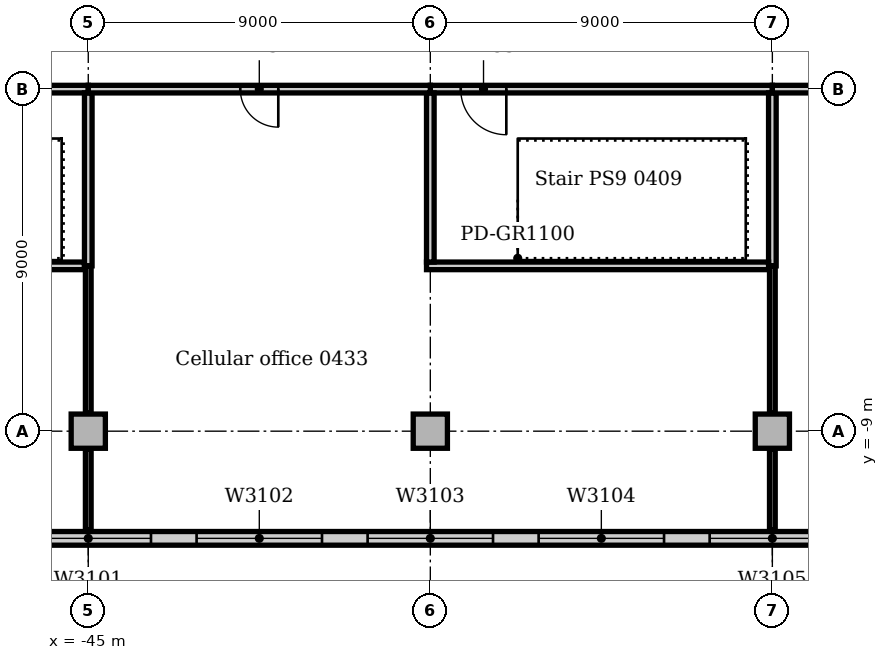
"""IFC4 building model, lengths in metres.
Left out: names, types, materials, properties, quantities, classifications, styles, units other than length and angle.
Written with IfcOpenShell. Run it as: python <this file> out.ifc"""

import sys

from ifc_helpers import new_model, si_unit, direction, frame, frame_2d, origin, origin_2d, place, context, subcontext, project, spatial, rectangle, extrude, element, fill, save


model = new_model("IFC4")
c1 = context("Model", 3, precision=1e-05, world=origin(), true_north=direction((0.0, 1.0)))
c2 = subcontext(c1, "Body", "Model", "MODEL_VIEW")
j1 = project(units=[si_unit("LENGTHUNIT", "METRE"), si_unit("PLANEANGLEUNIT", "RADIAN")], contexts=[c1])
p1 = place(None, origin())
s1 = spatial("IfcSite", under=j1, at=p1, CompositionType="ELEMENT")
p2 = place(p1, origin())
s2 = spatial("IfcBuilding", under=s1, at=p2, CompositionType="ELEMENT")
p3 = place(p2, frame((0.0, 0.0, 21.0)))
s3 = spatial("IfcBuildingStorey", under=s2, at=p3, CompositionType="ELEMENT", Elevation=21.0)
for number, where, z_axis, x_axis in (
    (1, (-45.0, -9.0, 0.0), (0.0, 0.0, 1.0), (1.0, 0.0, 0.0)),
    (2, (-36.0, -9.0, 0.0), (0.0, 0.0, 1.0), (1.0, 0.0, 0.0)),
    (3, (-27.0, -9.0, 0.0), (0.0, 0.0, 1.0), (1.0, 0.0, 0.0)),
):
    element("IfcColumn", number, at=place(p3, frame(where, z_axis=z_axis, x_axis=x_axis)), inside=s3, PredefinedType="COLUMN", context=c2, shape_type="SweptSolid", body=[
        extrude(rectangle(XDim=0.9, YDim=0.9, at=origin_2d()), origin(), (0.0, 0.0, 1.0), 4.7),
    ])
p4 = place(p3, frame((-81.0, -11.82, 0.0), z_axis=(0.0, 0.0, 1.0), x_axis=(1.0, 0.0, 0.0)))
e4 = element("IfcWall", 4, at=p4, inside=s3, PredefinedType="STANDARD", context=c2, shape_type="SweptSolid", body=[
    extrude(rectangle(XDim=144.0, YDim=0.36, at=frame_2d((72.0, 0.0))), origin(), (0.0, 0.0, 1.0), 4.85),
])
p5 = place(p4, frame((2.85, 0.0, 0.9)))
e5 = element("IfcOpeningElement", 5, at=p5, cuts=e4, PredefinedType="OPENING", context=c2, shape_type="SweptSolid", body=[
    extrude(rectangle(XDim=3.3, YDim=2.4, at=frame_2d((1.65, 1.2))), frame((0.0, 0.19, 0.0), z_axis=(0.0, -1.0, 0.0), x_axis=(1.0, 0.0, 0.0)), (0.0, 0.0, 1.0), 0.38),
])
p6 = place(p4, frame((7.35, 0.0, 0.9)))
e6 = element("IfcOpeningElement", 6, at=p6, cuts=e4, PredefinedType="OPENING", context=c2, shape_type="SweptSolid", body=[
    extrude(rectangle(XDim=3.3, YDim=2.4, at=frame_2d((1.65, 1.2))), frame((0.0, 0.19, 0.0), z_axis=(0.0, -1.0, 0.0), x_axis=(1.0, 0.0, 0.0)), (0.0, 0.0, 1.0), 0.38),
])
p7 = place(p4, frame((11.85, 0.0, 0.9)))
e7 = element("IfcOpeningElement", 7, at=p7, cuts=e4, PredefinedType="OPENING", context=c2, shape_type="SweptSolid", body=[
    extrude(rectangle(XDim=3.3, YDim=2.4, at=frame_2d((1.65, 1.2))), frame((0.0, 0.19, 0.0), z_axis=(0.0, -1.0, 0.0), x_axis=(1.0, 0.0, 0.0)), (0.0, 0.0, 1.0), 0.38),
])
p8 = place(p4, frame((16.35, 0.0, 0.9)))
e8 = element("IfcOpeningElement", 8, at=p8, cuts=e4, PredefinedType="OPENING", context=c2, shape_type="SweptSolid", body=[
    extrude(rectangle(XDim=3.3, YDim=2.4, at=frame_2d((1.65, 1.2))), frame((0.0, 0.19, 0.0), z_axis=(0.0, -1.0, 0.0), x_axis=(1.0, 0.0, 0.0)), (0.0, 0.0, 1.0), 0.38),
])
p9 = place(p4, frame((20.85, 0.0, 0.9)))
e9 = element("IfcOpeningElement", 9, at=p9, cuts=e4, PredefinedType="OPENING", context=c2, shape_type="SweptSolid", body=[
    extrude(rectangle(XDim=3.3, YDim=2.4, at=frame_2d((1.65, 1.2))), frame((0.0, 0.19, 0.0), z_axis=(0.0, -1.0, 0.0), x_axis=(1.0, 0.0, 0.0)), (0.0, 0.0, 1.0), 0.38),
])
p10 = place(p4, frame((25.35, 0.0, 0.9)))
e10 = element("IfcOpeningElement", 10, at=p10, cuts=e4, PredefinedType="OPENING", context=c2, shape_type="SweptSolid", body=[
    extrude(rectangle(XDim=3.3, YDim=2.4, at=frame_2d((1.65, 1.2))), frame((0.0, 0.19, 0.0), z_axis=(0.0, -1.0, 0.0), x_axis=(1.0, 0.0, 0.0)), (0.0, 0.0, 1.0), 0.38),
])
p11 = place(p4, frame((29.85, 0.0, 0.9)))
e11 = element("IfcOpeningElement", 11, at=p11, cuts=e4, PredefinedType="OPENING", context=c2, shape_type="SweptSolid", body=[
    extrude(rectangle(XDim=3.3, YDim=2.4, at=frame_2d((1.65, 1.2))), frame((0.0, 0.19, 0.0), z_axis=(0.0, -1.0, 0.0), x_axis=(1.0, 0.0, 0.0)), (0.0, 0.0, 1.0), 0.38),
])
p12 = place(p4, frame((34.35, 0.0, 0.9)))
e12 = element("IfcOpeningElement", 12, at=p12, cuts=e4, PredefinedType="OPENING", context=c2, shape_type="SweptSolid", body=[
    extrude(rectangle(XDim=3.3, YDim=2.4, at=frame_2d((1.65, 1.2))), frame((0.0, 0.19, 0.0), z_axis=(0.0, -1.0, 0.0), x_axis=(1.0, 0.0, 0.0)), (0.0, 0.0, 1.0), 0.38),
])
p13 = place(p4, frame((38.85, 0.0, 0.9)))
e13 = element("IfcOpeningElement", 13, at=p13, cuts=e4, PredefinedType="OPENING", context=c2, shape_type="SweptSolid", body=[
    extrude(rectangle(XDim=3.3, YDim=2.4, at=frame_2d((1.65, 1.2))), frame((0.0, 0.19, 0.0), z_axis=(0.0, -1.0, 0.0), x_axis=(1.0, 0.0, 0.0)), (0.0, 0.0, 1.0), 0.38),
])
p14 = place(p4, frame((43.35, 0.0, 0.9)))
e14 = element("IfcOpeningElement", 14, at=p14, cuts=e4, PredefinedType="OPENING", context=c2, shape_type="SweptSolid", body=[
    extrude(rectangle(XDim=3.3, YDim=2.4, at=frame_2d((1.65, 1.2))), frame((0.0, 0.19, 0.0), z_axis=(0.0, -1.0, 0.0), x_axis=(1.0, 0.0, 0.0)), (0.0, 0.0, 1.0), 0.38),
])
p15 = place(p4, frame((47.85, 0.0, 0.9)))
e15 = element("IfcOpeningElement", 15, at=p15, cuts=e4, PredefinedType="OPENING", context=c2, shape_type="SweptSolid", body=[
    extrude(rectangle(XDim=3.3, YDim=2.4, at=frame_2d((1.65, 1.2))), frame((0.0, 0.19, 0.0), z_axis=(0.0, -1.0, 0.0), x_axis=(1.0, 0.0, 0.0)), (0.0, 0.0, 1.0), 0.38),
])
p16 = place(p4, frame((52.35, 0.0, 0.9)))
e16 = element("IfcOpeningElement", 16, at=p16, cuts=e4, PredefinedType="OPENING", context=c2, shape_type="SweptSolid", body=[
    extrude(rectangle(XDim=3.3, YDim=2.4, at=frame_2d((1.65, 1.2))), frame((0.0, 0.19, 0.0), z_axis=(0.0, -1.0, 0.0), x_axis=(1.0, 0.0, 0.0)), (0.0, 0.0, 1.0), 0.38),
])
p17 = place(p4, frame((56.85, 0.0, 0.9)))
e17 = element("IfcOpeningElement", 17, at=p17, cuts=e4, PredefinedType="OPENING", context=c2, shape_type="SweptSolid", body=[
    extrude(rectangle(XDim=3.3, YDim=2.4, at=frame_2d((1.65, 1.2))), frame((0.0, 0.19, 0.0), z_axis=(0.0, -1.0, 0.0), x_axis=(1.0, 0.0, 0.0)), (0.0, 0.0, 1.0), 0.38),
])
p18 = place(p4, frame((61.35, 0.0, 0.9)))
e18 = element("IfcOpeningElement", 18, at=p18, cuts=e4, PredefinedType="OPENING", context=c2, shape_type="SweptSolid", body=[
    extrude(rectangle(XDim=3.3, YDim=2.4, at=frame_2d((1.65, 1.2))), frame((0.0, 0.19, 0.0), z_axis=(0.0, -1.0, 0.0), x_axis=(1.0, 0.0, 0.0)), (0.0, 0.0, 1.0), 0.38),
])
p19 = place(p4, frame((65.85, 0.0, 0.9)))
e19 = element("IfcOpeningElement", 19, at=p19, cuts=e4, PredefinedType="OPENING", context=c2, shape_type="SweptSolid", body=[
    extrude(rectangle(XDim=3.3, YDim=2.4, at=frame_2d((1.65, 1.2))), frame((0.0, 0.19, 0.0), z_axis=(0.0, -1.0, 0.0), x_axis=(1.0, 0.0, 0.0)), (0.0, 0.0, 1.0), 0.38),
])
p20 = place(p4, frame((70.35, 0.0, 0.9)))
e20 = element("IfcOpeningElement", 20, at=p20, cuts=e4, PredefinedType="OPENING", context=c2, shape_type="SweptSolid", body=[
    extrude(rectangle(XDim=3.3, YDim=2.4, at=frame_2d((1.65, 1.2))), frame((0.0, 0.19, 0.0), z_axis=(0.0, -1.0, 0.0), x_axis=(1.0, 0.0, 0.0)), (0.0, 0.0, 1.0), 0.38),
])
p21 = place(p4, frame((74.85, 0.0, 0.9)))
e21 = element("IfcOpeningElement", 21, at=p21, cuts=e4, PredefinedType="OPENING", context=c2, shape_type="SweptSolid", body=[
    extrude(rectangle(XDim=3.3, YDim=2.4, at=frame_2d((1.65, 1.2))), frame((0.0, 0.19, 0.0), z_axis=(0.0, -1.0, 0.0), x_axis=(1.0, 0.0, 0.0)), (0.0, 0.0, 1.0), 0.38),
])
p22 = place(p4, frame((79.35, 0.0, 0.9)))
e22 = element("IfcOpeningElement", 22, at=p22, cuts=e4, PredefinedType="OPENING", context=c2, shape_type="SweptSolid", body=[
    extrude(rectangle(XDim=3.3, YDim=2.4, at=frame_2d((1.65, 1.2))), frame((0.0, 0.19, 0.0), z_axis=(0.0, -1.0, 0.0), x_axis=(1.0, 0.0, 0.0)), (0.0, 0.0, 1.0), 0.38),
])
p23 = place(p4, frame((83.85, 0.0, 0.9)))
e23 = element("IfcOpeningElement", 23, at=p23, cuts=e4, PredefinedType="OPENING", context=c2, shape_type="SweptSolid", body=[
    extrude(rectangle(XDim=3.3, YDim=2.4, at=frame_2d((1.65, 1.2))), frame((0.0, 0.19, 0.0), z_axis=(0.0, -1.0, 0.0), x_axis=(1.0, 0.0, 0.0)), (0.0, 0.0, 1.0), 0.38),
])
p24 = place(p4, frame((88.35, 0.0, 0.9)))
e24 = element("IfcOpeningElement", 24, at=p24, cuts=e4, PredefinedType="OPENING", context=c2, shape_type="SweptSolid", body=[
    extrude(rectangle(XDim=3.3, YDim=2.4, at=frame_2d((1.65, 1.2))), frame((0.0, 0.19, 0.0), z_axis=(0.0, -1.0, 0.0), x_axis=(1.0, 0.0, 0.0)), (0.0, 0.0, 1.0), 0.38),
])
p25 = place(p4, frame((92.85, 0.0, 0.9)))
e25 = element("IfcOpeningElement", 25, at=p25, cuts=e4, PredefinedType="OPENING", context=c2, shape_type="SweptSolid", body=[
    extrude(rectangle(XDim=3.3, YDim=2.4, at=frame_2d((1.65, 1.2))), frame((0.0, 0.19, 0.0), z_axis=(0.0, -1.0, 0.0), x_axis=(1.0, 0.0, 0.0)), (0.0, 0.0, 1.0), 0.38),
])
p26 = place(p4, frame((97.35, 0.0, 0.9)))
e26 = element("IfcOpeningElement", 26, at=p26, cuts=e4, PredefinedType="OPENING", context=c2, shape_type="SweptSolid", body=[
    extrude(rectangle(XDim=3.3, YDim=2.4, at=frame_2d((1.65, 1.2))), frame((0.0, 0.19, 0.0), z_axis=(0.0, -1.0, 0.0), x_axis=(1.0, 0.0, 0.0)), (0.0, 0.0, 1.0), 0.38),
])
p27 = place(p4, frame((101.85, 0.0, 0.9)))
e27 = element("IfcOpeningElement", 27, at=p27, cuts=e4, PredefinedType="OPENING", context=c2, shape_type="SweptSolid", body=[
    extrude(rectangle(XDim=3.3, YDim=2.4, at=frame_2d((1.65, 1.2))), frame((0.0, 0.19, 0.0), z_axis=(0.0, -1.0, 0.0), x_axis=(1.0, 0.0, 0.0)), (0.0, 0.0, 1.0), 0.38),
])
p28 = place(p4, frame((106.35, 0.0, 0.9)))
e28 = element("IfcOpeningElement", 28, at=p28, cuts=e4, PredefinedType="OPENING", context=c2, shape_type="SweptSolid", body=[
    extrude(rectangle(XDim=3.3, YDim=2.4, at=frame_2d((1.65, 1.2))), frame((0.0, 0.19, 0.0), z_axis=(0.0, -1.0, 0.0), x_axis=(1.0, 0.0, 0.0)), (0.0, 0.0, 1.0), 0.38),
])
p29 = place(p4, frame((110.85, 0.0, 0.9)))
e29 = element("IfcOpeningElement", 29, at=p29, cuts=e4, PredefinedType="OPENING", context=c2, shape_type="SweptSolid", body=[
    extrude(rectangle(XDim=3.3, YDim=2.4, at=frame_2d((1.65, 1.2))), frame((0.0, 0.19, 0.0), z_axis=(0.0, -1.0, 0.0), x_axis=(1.0, 0.0, 0.0)), (0.0, 0.0, 1.0), 0.38),
])
p30 = place(p4, frame((115.35, 0.0, 0.9)))
e30 = element("IfcOpeningElement", 30, at=p30, cuts=e4, PredefinedType="OPENING", context=c2, shape_type="SweptSolid", body=[
    extrude(rectangle(XDim=3.3, YDim=2.4, at=frame_2d((1.65, 1.2))), frame((0.0, 0.19, 0.0), z_axis=(0.0, -1.0, 0.0), x_axis=(1.0, 0.0, 0.0)), (0.0, 0.0, 1.0), 0.38),
])
p31 = place(p4, frame((119.85, 0.0, 0.9)))
e31 = element("IfcOpeningElement", 31, at=p31, cuts=e4, PredefinedType="OPENING", context=c2, shape_type="SweptSolid", body=[
    extrude(rectangle(XDim=3.3, YDim=2.4, at=frame_2d((1.65, 1.2))), frame((0.0, 0.19, 0.0), z_axis=(0.0, -1.0, 0.0), x_axis=(1.0, 0.0, 0.0)), (0.0, 0.0, 1.0), 0.38),
])
p32 = place(p4, frame((124.35, 0.0, 0.9)))
e32 = element("IfcOpeningElement", 32, at=p32, cuts=e4, PredefinedType="OPENING", context=c2, shape_type="SweptSolid", body=[
    extrude(rectangle(XDim=3.3, YDim=2.4, at=frame_2d((1.65, 1.2))), frame((0.0, 0.19, 0.0), z_axis=(0.0, -1.0, 0.0), x_axis=(1.0, 0.0, 0.0)), (0.0, 0.0, 1.0), 0.38),
])
p33 = place(p4, frame((128.85, 0.0, 0.9)))
e33 = element("IfcOpeningElement", 33, at=p33, cuts=e4, PredefinedType="OPENING", context=c2, shape_type="SweptSolid", body=[
    extrude(rectangle(XDim=3.3, YDim=2.4, at=frame_2d((1.65, 1.2))), frame((0.0, 0.19, 0.0), z_axis=(0.0, -1.0, 0.0), x_axis=(1.0, 0.0, 0.0)), (0.0, 0.0, 1.0), 0.38),
])
p34 = place(p4, frame((133.35, 0.0, 0.9)))
e34 = element("IfcOpeningElement", 34, at=p34, cuts=e4, PredefinedType="OPENING", context=c2, shape_type="SweptSolid", body=[
    extrude(rectangle(XDim=3.3, YDim=2.4, at=frame_2d((1.65, 1.2))), frame((0.0, 0.19, 0.0), z_axis=(0.0, -1.0, 0.0), x_axis=(1.0, 0.0, 0.0)), (0.0, 0.0, 1.0), 0.38),
])
p35 = place(p4, frame((137.85, 0.0, 0.9)))
e35 = element("IfcOpeningElement", 35, at=p35, cuts=e4, PredefinedType="OPENING", context=c2, shape_type="SweptSolid", body=[
    extrude(rectangle(XDim=3.3, YDim=2.4, at=frame_2d((1.65, 1.2))), frame((0.0, 0.19, 0.0), z_axis=(0.0, -1.0, 0.0), x_axis=(1.0, 0.0, 0.0)), (0.0, 0.0, 1.0), 0.38),
])
p36 = place(p3, frame((-54.0, 0.0, 0.0), z_axis=(0.0, 0.0, 1.0), x_axis=(1.0, 0.0, 0.0)))
e36 = element("IfcWall", 36, at=p36, inside=s3, PredefinedType="SOLIDWALL", context=c2, shape_type="SweptSolid", body=[
    extrude(rectangle(XDim=9.0, YDim=0.2, at=frame_2d((4.5, 0.0))), origin(), (0.0, 0.0, 1.0), 4.7),
])
p37 = place(p36, frame((0.8, 0.0, 0.0)))
e37 = element("IfcOpeningElement", 37, at=p37, cuts=e36, PredefinedType="OPENING", context=c2, shape_type="SweptSolid", body=[
    extrude(rectangle(XDim=1.2, YDim=2.1, at=frame_2d((0.6, 1.05))), frame((0.0, 0.11, 0.0), z_axis=(0.0, -1.0, 0.0), x_axis=(1.0, 0.0, 0.0)), (0.0, 0.0, 1.0), 0.22),
])
p38 = place(p3, frame((-54.1, -4.65, 0.0), z_axis=(0.0, 0.0, 1.0), x_axis=(1.0, 0.0, 0.0)))
e38 = element("IfcWall", 38, at=p38, inside=s3, PredefinedType="SOLIDWALL", context=c2, shape_type="SweptSolid", body=[
    extrude(rectangle(XDim=9.0, YDim=0.2, at=frame_2d((4.5, 0.0))), origin(), (0.0, 0.0, 1.0), 4.7),
])
p39 = place(p3, frame((-45.0, -4.65, 0.0), z_axis=(0.0, 0.0, 1.0), x_axis=(0.0, 1.0, 0.0)))
e39 = element("IfcWall", 39, at=p39, inside=s3, PredefinedType="SOLIDWALL", context=c2, shape_type="SweptSolid", body=[
    extrude(rectangle(XDim=4.55, YDim=0.2, at=frame_2d((2.275, 0.0))), origin(), (0.0, 0.0, 1.0), 4.7),
])
p40 = place(p3, frame((-36.0, 0.0, 0.0), z_axis=(0.0, 0.0, 1.0), x_axis=(1.0, 0.0, 0.0)))
e40 = element("IfcWall", 40, at=p40, inside=s3, PredefinedType="SOLIDWALL", context=c2, shape_type="SweptSolid", body=[
    extrude(rectangle(XDim=9.0, YDim=0.2, at=frame_2d((4.5, 0.0))), origin(), (0.0, 0.0, 1.0), 4.7),
])
p41 = place(p40, frame((0.8, 0.0, 0.0)))
e41 = element("IfcOpeningElement", 41, at=p41, cuts=e40, PredefinedType="OPENING", context=c2, shape_type="SweptSolid", body=[
    extrude(rectangle(XDim=1.2, YDim=2.1, at=frame_2d((0.6, 1.05))), frame((0.0, 0.11, 0.0), z_axis=(0.0, -1.0, 0.0), x_axis=(1.0, 0.0, 0.0)), (0.0, 0.0, 1.0), 0.22),
])
p42 = place(p3, frame((-27.0, -4.65, 0.0), z_axis=(0.0, 0.0, 1.0), x_axis=(0.0, 1.0, 0.0)))
e42 = element("IfcWall", 42, at=p42, inside=s3, PredefinedType="SOLIDWALL", context=c2, shape_type="SweptSolid", body=[
    extrude(rectangle(XDim=4.55, YDim=0.2, at=frame_2d((2.275, 0.0))), origin(), (0.0, 0.0, 1.0), 4.7),
])
p43 = place(p3, frame((-36.1, -4.65, 0.0), z_axis=(0.0, 0.0, 1.0), x_axis=(1.0, 0.0, 0.0)))
e43 = element("IfcWall", 43, at=p43, inside=s3, PredefinedType="SOLIDWALL", context=c2, shape_type="SweptSolid", body=[
    extrude(rectangle(XDim=9.0, YDim=0.2, at=frame_2d((4.5, 0.0))), origin(), (0.0, 0.0, 1.0), 4.7),
])
p44 = place(p3, frame((-36.0, -4.55, 0.0), z_axis=(0.0, 0.0, 1.0), x_axis=(0.0, 1.0, 0.0)))
e44 = element("IfcWall", 44, at=p44, inside=s3, PredefinedType="SOLIDWALL", context=c2, shape_type="SweptSolid", body=[
    extrude(rectangle(XDim=4.45, YDim=0.2, at=frame_2d((2.225, 0.0))), origin(), (0.0, 0.0, 1.0), 4.7),
])
p45 = place(p3, frame((-45.0, 0.0, 0.0), z_axis=(0.0, 0.0, 1.0), x_axis=(1.0, 0.0, 0.0)))
e45 = element("IfcWall", 45, at=p45, inside=s3, PredefinedType="PARTITIONING", context=c2, shape_type="SweptSolid", body=[
    extrude(rectangle(XDim=9.0, YDim=0.2, at=frame_2d((4.5, 0.0))), origin(), (0.0, 0.0, 1.0), 4.7),
])
p46 = place(p45, frame((4.0, 0.0, 0.0)))
e46 = element("IfcOpeningElement", 46, at=p46, cuts=e45, PredefinedType="OPENING", context=c2, shape_type="SweptSolid", body=[
    extrude(rectangle(XDim=1.0, YDim=2.1, at=frame_2d((0.5, 1.05))), frame((0.0, 0.11, 0.0), z_axis=(0.0, -1.0, 0.0), x_axis=(1.0, 0.0, 0.0)), (0.0, 0.0, 1.0), 0.22),
])
p47 = place(p3, frame((-27.0, 0.0, 0.0), z_axis=(0.0, 0.0, 1.0), x_axis=(1.0, 0.0, 0.0)))
e47 = element("IfcWall", 47, at=p47, inside=s3, PredefinedType="PARTITIONING", context=c2, shape_type="SweptSolid", body=[
    extrude(rectangle(XDim=8.53, YDim=0.2, at=frame_2d((4.265, 0.0))), origin(), (0.0, 0.0, 1.0), 4.7),
])
p48 = place(p47, frame((4.0, 0.0, 0.0)))
e48 = element("IfcOpeningElement", 48, at=p48, cuts=e47, PredefinedType="OPENING", context=c2, shape_type="SweptSolid", body=[
    extrude(rectangle(XDim=1.0, YDim=2.1, at=frame_2d((0.5, 1.05))), frame((0.0, 0.11, 0.0), z_axis=(0.0, -1.0, 0.0), x_axis=(1.0, 0.0, 0.0)), (0.0, 0.0, 1.0), 0.22),
])
p49 = place(p3, frame((-27.0, -11.6, 0.0), z_axis=(0.0, 0.0, 1.0), x_axis=(0.0, 1.0, 0.0)))
e49 = element("IfcWall", 49, at=p49, inside=s3, PredefinedType="PARTITIONING", context=c2, shape_type="SweptSolid", body=[
    extrude(rectangle(XDim=2.13, YDim=0.15, at=frame_2d((1.065, 0.0))), origin(), (0.0, 0.0, 1.0), 4.7),
])
p50 = place(p3, frame((-27.0, -8.53, 0.0), z_axis=(0.0, 0.0, 1.0), x_axis=(0.0, 1.0, 0.0)))
e50 = element("IfcWall", 50, at=p50, inside=s3, PredefinedType="PARTITIONING", context=c2, shape_type="SweptSolid", body=[
    extrude(rectangle(XDim=3.88, YDim=0.15, at=frame_2d((1.94, 0.0))), origin(), (0.0, 0.0, 1.0), 4.7),
])
p51 = place(p3, frame((-45.0, -11.6, 0.0), z_axis=(0.0, 0.0, 1.0), x_axis=(0.0, 1.0, 0.0)))
e51 = element("IfcWall", 51, at=p51, inside=s3, PredefinedType="PARTITIONING", context=c2, shape_type="SweptSolid", body=[
    extrude(rectangle(XDim=2.13, YDim=0.15, at=frame_2d((1.065, 0.0))), origin(), (0.0, 0.0, 1.0), 4.7),
])
p52 = place(p3, frame((-45.0, -8.53, 0.0), z_axis=(0.0, 0.0, 1.0), x_axis=(0.0, 1.0, 0.0)))
e52 = element("IfcWall", 52, at=p52, inside=s3, PredefinedType="PARTITIONING", context=c2, shape_type="SweptSolid", body=[
    extrude(rectangle(XDim=3.88, YDim=0.15, at=frame_2d((1.94, 0.0))), origin(), (0.0, 0.0, 1.0), 4.7),
])
p53 = place(p12, origin())
e53 = element("IfcWindow", 53, at=p53, inside=s3, PartitioningType="SINGLE_PANEL", PredefinedType="WINDOW", context=c2, shape_type="SweptSolid", body=[
    extrude(rectangle(XDim=3.3, YDim=2.4, at=frame_2d((1.65, 1.2))), frame((0.0, 0.13, 0.0), z_axis=(0.0, -1.0, 0.0), x_axis=(1.0, 0.0, 0.0)), (0.0, 0.0, 1.0), 0.06),
])
fill(e12, e53)
p54 = place(p13, origin())
e54 = element("IfcWindow", 54, at=p54, inside=s3, PartitioningType="SINGLE_PANEL", PredefinedType="WINDOW", context=c2, shape_type="SweptSolid", body=[
    extrude(rectangle(XDim=3.3, YDim=2.4, at=frame_2d((1.65, 1.2))), frame((0.0, 0.13, 0.0), z_axis=(0.0, -1.0, 0.0), x_axis=(1.0, 0.0, 0.0)), (0.0, 0.0, 1.0), 0.06),
])
fill(e13, e54)
p55 = place(p14, origin())
e55 = element("IfcWindow", 55, at=p55, inside=s3, PartitioningType="SINGLE_PANEL", PredefinedType="WINDOW", context=c2, shape_type="SweptSolid", body=[
    extrude(rectangle(XDim=3.3, YDim=2.4, at=frame_2d((1.65, 1.2))), frame((0.0, 0.13, 0.0), z_axis=(0.0, -1.0, 0.0), x_axis=(1.0, 0.0, 0.0)), (0.0, 0.0, 1.0), 0.06),
])
fill(e14, e55)
p56 = place(p15, origin())
e56 = element("IfcWindow", 56, at=p56, inside=s3, PartitioningType="SINGLE_PANEL", PredefinedType="WINDOW", context=c2, shape_type="SweptSolid", body=[
    extrude(rectangle(XDim=3.3, YDim=2.4, at=frame_2d((1.65, 1.2))), frame((0.0, 0.13, 0.0), z_axis=(0.0, -1.0, 0.0), x_axis=(1.0, 0.0, 0.0)), (0.0, 0.0, 1.0), 0.06),
])
fill(e15, e56)
p57 = place(p16, origin())
e57 = element("IfcWindow", 57, at=p57, inside=s3, PartitioningType="SINGLE_PANEL", PredefinedType="WINDOW", context=c2, shape_type="SweptSolid", body=[
    extrude(rectangle(XDim=3.3, YDim=2.4, at=frame_2d((1.65, 1.2))), frame((0.0, 0.13, 0.0), z_axis=(0.0, -1.0, 0.0), x_axis=(1.0, 0.0, 0.0)), (0.0, 0.0, 1.0), 0.06),
])
fill(e16, e57)
p58 = place(p46, frame((1.0, 0.0, 0.0), z_axis=(0.0, 0.0, 1.0), x_axis=(-1.0, 0.0, 0.0)))
e58 = element("IfcDoor", 58, at=p58, inside=s3, OperationType="SINGLE_SWING_LEFT", PredefinedType="DOOR", context=c2, shape_type="SweptSolid", body=[
    extrude(rectangle(XDim=1.0, YDim=2.1, at=frame_2d((0.5, 1.05))), frame((0.0, 0.025, 0.0), z_axis=(0.0, -1.0, 0.0), x_axis=(1.0, 0.0, 0.0)), (0.0, 0.0, 1.0), 0.05),
])
fill(e46, e58)
p59 = place(p41, frame((1.2, 0.0, 0.0), z_axis=(0.0, 0.0, 1.0), x_axis=(-1.0, 0.0, 0.0)))
e59 = element("IfcDoor", 59, at=p59, inside=s3, OperationType="SINGLE_SWING_LEFT", PredefinedType="DOOR", context=c2, shape_type="SweptSolid", body=[
    extrude(rectangle(XDim=1.2, YDim=2.1, at=frame_2d((0.6, 1.05))), frame((0.0, 0.025, 0.0), z_axis=(0.0, -1.0, 0.0), x_axis=(1.0, 0.0, 0.0)), (0.0, 0.0, 1.0), 0.05),
])
fill(e41, e59)
save(model, sys.argv[1])
